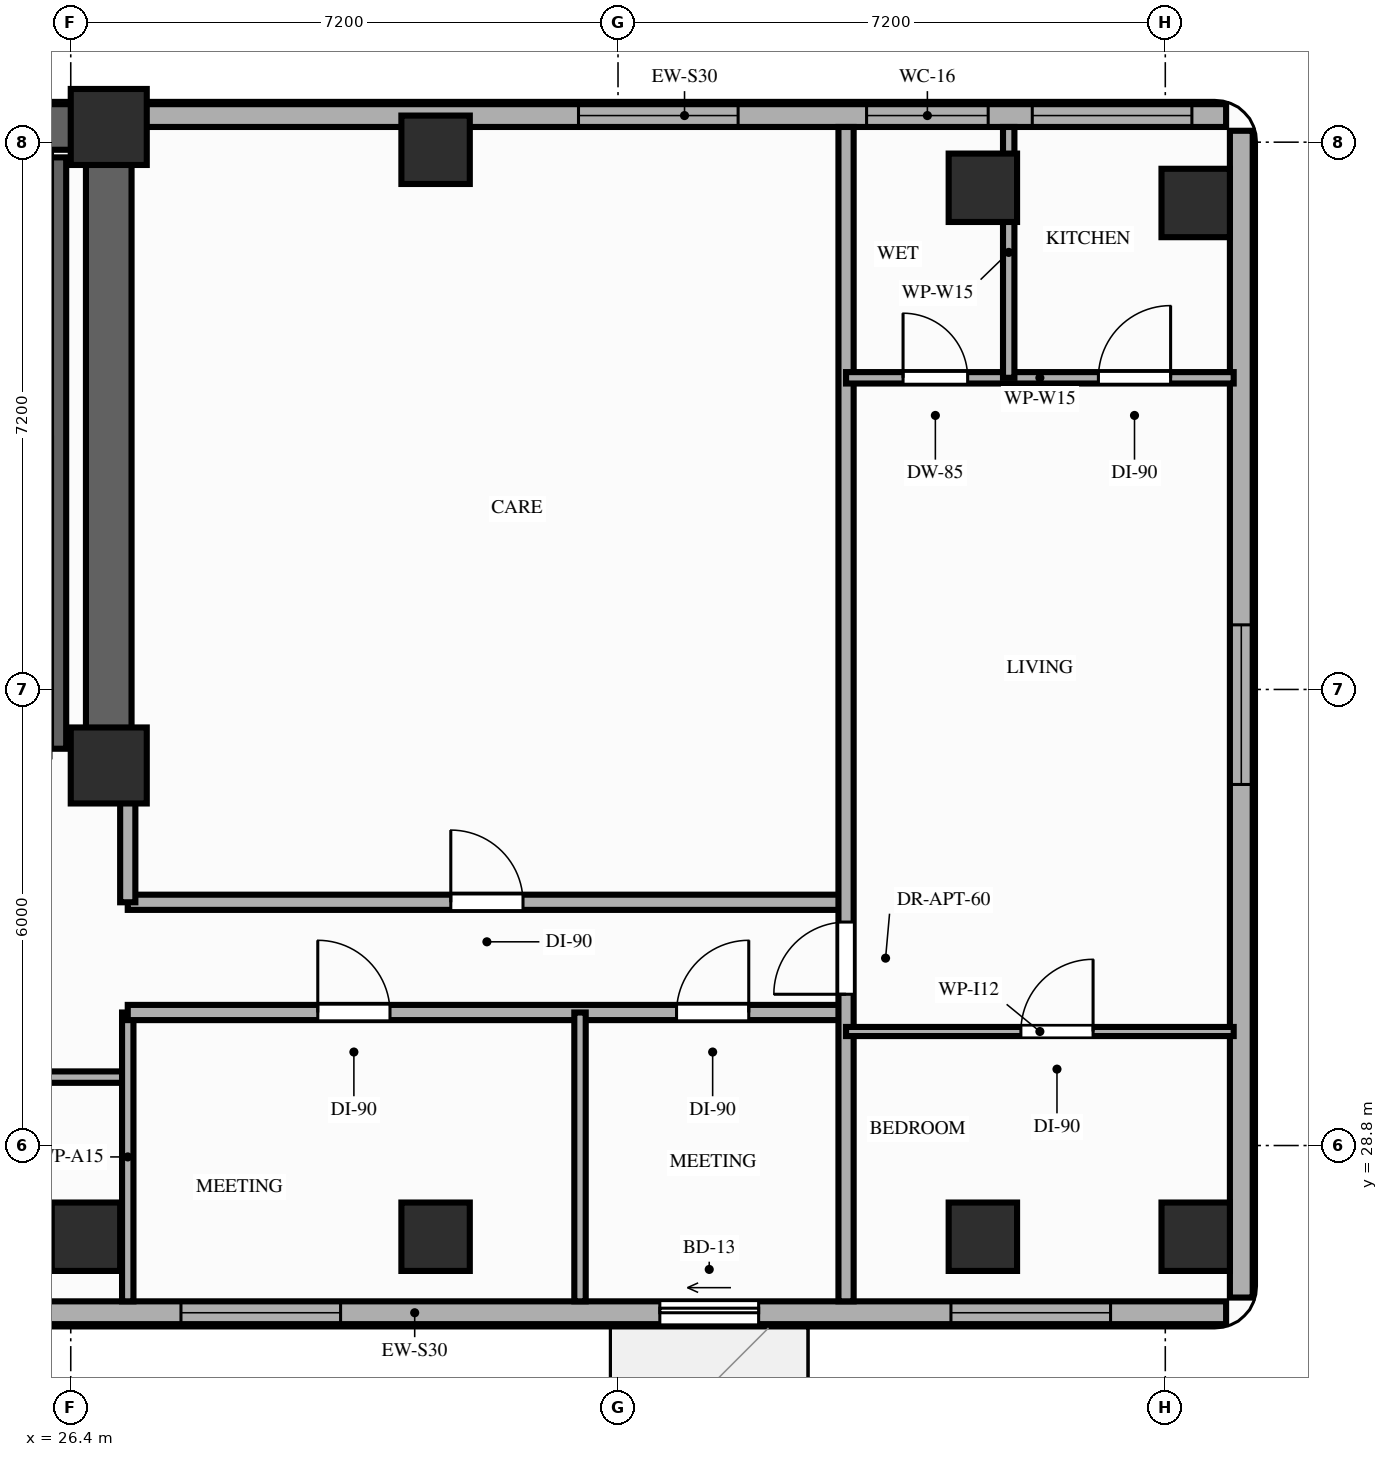
"""IFC4 building model, lengths in metres.
Left out: names, types, materials, properties, quantities, classifications, styles, units other than length and angle.
Written with IfcOpenShell. Run it as: python <this file> out.ifc"""

import sys

from ifc_helpers import new_model, si_unit, direction, frame, frame_2d, origin, origin_2d, place, context, subcontext, project, spatial, rectangle, extrude, element, fill, save


model = new_model("IFC4")
c1 = context("Model", 3, precision=1e-05, world=origin(), true_north=direction((0.0, 1.0)))
c2 = subcontext(c1, "Body", "Model", "MODEL_VIEW")
j1 = project(units=[si_unit("LENGTHUNIT", "METRE"), si_unit("PLANEANGLEUNIT", "RADIAN")], contexts=[c1])
p1 = place(None, origin())
s1 = spatial("IfcSite", under=j1, at=p1, CompositionType="ELEMENT")
p2 = place(p1, origin())
s2 = spatial("IfcBuilding", under=s1, at=p2, CompositionType="ELEMENT")
p3 = place(p2, frame((0.0, 0.0, 188.8)))
s3 = spatial("IfcBuildingStorey", under=s2, at=p3, CompositionType="ELEMENT", Elevation=188.8)
for number, where, z_axis, x_axis in (
    (1, (26.9, 33.8, 0.0), (0.0, 0.0, 1.0), (1.0, 0.0, 0.0)),
    (2, (26.9, 42.2, 0.0), (0.0, 0.0, 1.0), (1.0, 0.0, 0.0)),
):
    element("IfcColumn", number, at=place(p3, frame(where, z_axis=z_axis, x_axis=x_axis)), inside=s3, PredefinedType="COLUMN", context=c2, shape_type="SweptSolid", body=[
        extrude(rectangle(XDim=1.0, YDim=1.0, at=origin_2d()), origin(), (0.0, 0.0, 1.0), 3.2),
    ])
for number, where, z_axis, x_axis in (
    (3, (26.6, 27.6, 0.0), (0.0, 0.0, 1.0), (1.0, 0.0, 0.0)),
    (4, (31.2, 27.6, 0.0), (0.0, 0.0, 1.0), (1.0, 0.0, 0.0)),
    (5, (31.2, 41.9, 0.0), (0.0, 0.0, 1.0), (1.0, 0.0, 0.0)),
    (6, (38.4, 27.6, 0.0), (0.0, 0.0, 1.0), (1.0, 0.0, 0.0)),
    (7, (38.4, 41.4, 0.0), (0.0, 0.0, 1.0), (1.0, 0.0, 0.0)),
    (8, (41.2, 27.6, 0.0), (0.0, 0.0, 1.0), (1.0, 0.0, 0.0)),
    (9, (41.2, 41.2, 0.0), (0.0, 0.0, 1.0), (1.0, 0.0, 0.0)),
):
    element("IfcColumn", number, at=place(p3, frame(where, z_axis=z_axis, x_axis=x_axis)), inside=s3, PredefinedType="COLUMN", context=c2, shape_type="SweptSolid", body=[
        extrude(rectangle(XDim=0.9, YDim=0.9, at=origin_2d()), origin(), (0.0, 0.0, 1.0), 3.2),
    ])
p4 = place(p3, frame((41.6, 42.35, 0.0), z_axis=(0.0, 0.0, 1.0), x_axis=(-1.0, 0.0, 0.0)))
e10 = element("IfcWall", 10, at=p4, inside=s3, PredefinedType="STANDARD", context=c2, shape_type="SweptSolid", body=[
    extrude(rectangle(XDim=14.25, YDim=0.3, at=frame_2d((7.125, 0.0))), origin(), (0.0, 0.0, 1.0), 2.51),
])
p5 = place(p4, frame((3.13, 0.0, 0.85)))
e11 = element("IfcOpeningElement", 11, at=p5, cuts=e10, PredefinedType="OPENING", context=c2, shape_type="SweptSolid", body=[
    extrude(rectangle(XDim=1.6, YDim=1.41, at=frame_2d((0.8, 0.705))), frame((0.0, 0.16, 0.0), z_axis=(0.0, -1.0, 0.0), x_axis=(1.0, 0.0, 0.0)), (0.0, 0.0, 1.0), 0.32),
])
p6 = place(p4, frame((0.45, 0.0, 0.85)))
e12 = element("IfcOpeningElement", 12, at=p6, cuts=e10, PredefinedType="OPENING", context=c2, shape_type="SweptSolid", body=[
    extrude(rectangle(XDim=2.1, YDim=1.41, at=frame_2d((1.05, 0.705))), frame((0.0, 0.16, 0.0), z_axis=(0.0, -1.0, 0.0), x_axis=(1.0, 0.0, 0.0)), (0.0, 0.0, 1.0), 0.32),
])
p7 = place(p4, frame((6.42, 0.0, 0.85)))
e13 = element("IfcOpeningElement", 13, at=p7, cuts=e10, PredefinedType="OPENING", context=c2, shape_type="SweptSolid", body=[
    extrude(rectangle(XDim=2.1, YDim=1.41, at=frame_2d((1.05, 0.705))), frame((0.0, 0.16, 0.0), z_axis=(0.0, -1.0, 0.0), x_axis=(1.0, 0.0, 0.0)), (0.0, 0.0, 1.0), 0.32),
])
p8 = place(p3, frame((20.25, 26.6, 0.0), z_axis=(0.0, 0.0, 1.0), x_axis=(1.0, 0.0, 0.0)))
e14 = element("IfcWall", 14, at=p8, inside=s3, PredefinedType="STANDARD", context=c2, shape_type="SweptSolid", body=[
    extrude(rectangle(XDim=21.35, YDim=0.3, at=frame_2d((10.675, 0.0))), origin(), (0.0, 0.0, 1.0), 2.71),
])
p9 = place(p8, frame((13.9, 0.0, 0.0)))
e15 = element("IfcOpeningElement", 15, at=p9, cuts=e14, PredefinedType="OPENING", context=c2, shape_type="SweptSolid", body=[
    extrude(rectangle(XDim=1.3, YDim=2.08, at=frame_2d((0.65, 1.04))), frame((0.0, 0.16, 0.0), z_axis=(0.0, -1.0, 0.0), x_axis=(1.0, 0.0, 0.0)), (0.0, 0.0, 1.0), 0.32),
])
p10 = place(p8, frame((17.73, 0.0, 0.85)))
e16 = element("IfcOpeningElement", 16, at=p10, cuts=e14, PredefinedType="OPENING", context=c2, shape_type="SweptSolid", body=[
    extrude(rectangle(XDim=2.1, YDim=1.61, at=frame_2d((1.05, 0.805))), frame((0.0, 0.16, 0.0), z_axis=(0.0, -1.0, 0.0), x_axis=(1.0, 0.0, 0.0)), (0.0, 0.0, 1.0), 0.32),
])
p11 = place(p8, frame((2.1, 0.0, 0.85)))
e17 = element("IfcOpeningElement", 17, at=p11, cuts=e14, PredefinedType="OPENING", context=c2, shape_type="SweptSolid", body=[
    extrude(rectangle(XDim=2.1, YDim=1.61, at=frame_2d((1.05, 0.805))), frame((0.0, 0.16, 0.0), z_axis=(0.0, -1.0, 0.0), x_axis=(1.0, 0.0, 0.0)), (0.0, 0.0, 1.0), 0.32),
])
p12 = place(p8, frame((7.6, 0.0, 0.85)))
e18 = element("IfcOpeningElement", 18, at=p12, cuts=e14, PredefinedType="OPENING", context=c2, shape_type="SweptSolid", body=[
    extrude(rectangle(XDim=2.1, YDim=1.61, at=frame_2d((1.05, 0.805))), frame((0.0, 0.16, 0.0), z_axis=(0.0, -1.0, 0.0), x_axis=(1.0, 0.0, 0.0)), (0.0, 0.0, 1.0), 0.32),
])
p13 = place(p3, frame((41.8, 26.8, 0.0), z_axis=(0.0, 0.0, 1.0), x_axis=(0.0, 1.0, 0.0)))
e19 = element("IfcWall", 19, at=p13, inside=s3, PredefinedType="STANDARD", context=c2, shape_type="SweptSolid", body=[
    extrude(rectangle(XDim=15.35, YDim=0.3, at=frame_2d((7.675, 0.0))), origin(), (0.0, 0.0, 1.0), 3.02),
])
p14 = place(p13, frame((6.75, 0.0, 0.85)))
e20 = element("IfcOpeningElement", 20, at=p14, cuts=e19, PredefinedType="OPENING", context=c2, shape_type="SweptSolid", body=[
    extrude(rectangle(XDim=2.1, YDim=1.8, at=frame_2d((1.05, 0.9))), frame((0.0, 0.16, 0.0), z_axis=(0.0, -1.0, 0.0), x_axis=(1.0, 0.0, 0.0)), (0.0, 0.0, 1.0), 0.32),
])
p15 = place(p3, frame((6.45, 42.2, 0.0), z_axis=(0.0, 0.0, 1.0), x_axis=(1.0, 0.0, 0.0)))
e21 = element("IfcWall", 21, at=p15, inside=s3, PredefinedType="SHEAR", context=c2, shape_type="SweptSolid", body=[
    extrude(rectangle(XDim=20.45, YDim=0.6, at=frame_2d((10.225, 0.0))), origin(), (0.0, 0.0, 1.0), 3.02),
])
p16 = place(p3, frame((26.9, 33.8, 0.0), z_axis=(0.0, 0.0, 1.0), x_axis=(0.0, 1.0, 0.0)))
e22 = element("IfcWall", 22, at=p16, inside=s3, PredefinedType="SHEAR", context=c2, shape_type="SweptSolid", body=[
    extrude(rectangle(XDim=7.95, YDim=0.6, at=frame_2d((3.975, 0.0))), origin(), (0.0, 0.0, 1.0), 3.02),
])
p17 = place(p3, frame((26.24, 34.02, 0.0), z_axis=(0.0, 0.0, 1.0), x_axis=(0.0, 1.0, 0.0)))
e23 = element("IfcWall", 23, at=p17, inside=s3, PredefinedType="SHEAR", context=c2, shape_type="SweptSolid", body=[
    extrude(rectangle(XDim=7.78, YDim=0.2, at=frame_2d((3.89, 0.0))), origin(), (0.0, 0.0, 1.0), 3.02),
])
p18 = place(p3, frame((20.45, 29.7, 0.0), z_axis=(0.0, 0.0, 1.0), x_axis=(1.0, 0.0, 0.0)))
e24 = element("IfcWall", 24, at=p18, inside=s3, PredefinedType="PARTITIONING", context=c2, shape_type="SweptSolid", body=[
    extrude(rectangle(XDim=6.7, YDim=0.15, at=frame_2d((3.35, 0.0))), origin(), (0.0, 0.0, 1.0), 3.02),
])
p19 = place(p18, frame((2.8, 0.0, 0.0)))
e25 = element("IfcOpeningElement", 25, at=p19, cuts=e24, PredefinedType="OPENING", context=c2, shape_type="SweptSolid", body=[
    extrude(rectangle(XDim=0.95, YDim=2.15, at=frame_2d((0.475, 1.075))), frame((0.0, 0.085, 0.0), z_axis=(0.0, -1.0, 0.0), x_axis=(1.0, 0.0, 0.0)), (0.0, 0.0, 1.0), 0.17),
])
p20 = place(p3, frame((27.15, 26.75, 0.0), z_axis=(0.0, 0.0, 1.0), x_axis=(0.0, 1.0, 0.0)))
e26 = element("IfcWall", 26, at=p20, inside=s3, PredefinedType="PARTITIONING", context=c2, shape_type="SweptSolid", body=[
    extrude(rectangle(XDim=3.8, YDim=0.15, at=frame_2d((1.9, 0.0))), origin(), (0.0, 0.0, 1.0), 2.51),
])
p21 = place(p3, frame((27.15, 30.55, 0.0), z_axis=(0.0, 0.0, 1.0), x_axis=(1.0, 0.0, 0.0)))
e27 = element("IfcWall", 27, at=p21, inside=s3, PredefinedType="PARTITIONING", context=c2, shape_type="SweptSolid", body=[
    extrude(rectangle(XDim=9.45, YDim=0.2, at=frame_2d((4.725, 0.0))), origin(), (0.0, 0.0, 1.0), 2.51),
])
p22 = place(p21, frame((2.5, 0.0, 0.0)))
e28 = element("IfcOpeningElement", 28, at=p22, cuts=e27, PredefinedType="OPENING", context=c2, shape_type="SweptSolid", body=[
    extrude(rectangle(XDim=0.95, YDim=2.15, at=frame_2d((0.475, 1.075))), frame((0.0, 0.11, 0.0), z_axis=(0.0, -1.0, 0.0), x_axis=(1.0, 0.0, 0.0)), (0.0, 0.0, 1.0), 0.22),
])
p23 = place(p21, frame((7.22, 0.0, 0.0)))
e29 = element("IfcOpeningElement", 29, at=p23, cuts=e27, PredefinedType="OPENING", context=c2, shape_type="SweptSolid", body=[
    extrude(rectangle(XDim=0.95, YDim=2.15, at=frame_2d((0.475, 1.075))), frame((0.0, 0.11, 0.0), z_axis=(0.0, -1.0, 0.0), x_axis=(1.0, 0.0, 0.0)), (0.0, 0.0, 1.0), 0.22),
])
p24 = place(p3, frame((27.15, 32.0, 0.0), z_axis=(0.0, 0.0, 1.0), x_axis=(1.0, 0.0, 0.0)))
e30 = element("IfcWall", 30, at=p24, inside=s3, PredefinedType="PARTITIONING", context=c2, shape_type="SweptSolid", body=[
    extrude(rectangle(XDim=9.45, YDim=0.2, at=frame_2d((4.725, 0.0))), origin(), (0.0, 0.0, 1.0), 2.51),
])
p25 = place(p24, frame((4.25, 0.0, 0.0)))
e31 = element("IfcOpeningElement", 31, at=p25, cuts=e30, PredefinedType="OPENING", context=c2, shape_type="SweptSolid", body=[
    extrude(rectangle(XDim=0.95, YDim=2.15, at=frame_2d((0.475, 1.075))), frame((0.0, 0.11, 0.0), z_axis=(0.0, -1.0, 0.0), x_axis=(1.0, 0.0, 0.0)), (0.0, 0.0, 1.0), 0.22),
])
p26 = place(p3, frame((27.15, 32.0, 0.0), z_axis=(0.0, 0.0, 1.0), x_axis=(0.0, 1.0, 0.0)))
e32 = element("IfcWall", 32, at=p26, inside=s3, PredefinedType="PARTITIONING", context=c2, shape_type="SweptSolid", body=[
    extrude(rectangle(XDim=1.68, YDim=0.2, at=frame_2d((0.84, 0.0))), origin(), (0.0, 0.0, 1.0), 2.51),
])
p27 = place(p3, frame((36.6, 26.75, 0.0), z_axis=(0.0, 0.0, 1.0), x_axis=(0.0, 1.0, 0.0)))
e33 = element("IfcWall", 33, at=p27, inside=s3, PredefinedType="PARTITIONING", context=c2, shape_type="SweptSolid", body=[
    extrude(rectangle(XDim=15.45, YDim=0.2, at=frame_2d((7.725, 0.0))), origin(), (0.0, 0.0, 1.0), 2.51),
])
p28 = place(p27, frame((4.04, 0.0, 0.0)))
e34 = element("IfcOpeningElement", 34, at=p28, cuts=e33, PredefinedType="OPENING", context=c2, shape_type="SweptSolid", body=[
    extrude(rectangle(XDim=0.95, YDim=2.15, at=frame_2d((0.475, 1.075))), frame((0.0, 0.11, 0.0), z_axis=(0.0, -1.0, 0.0), x_axis=(1.0, 0.0, 0.0)), (0.0, 0.0, 1.0), 0.22),
])
p29 = place(p3, frame((36.6, 30.3, 0.0), z_axis=(0.0, 0.0, 1.0), x_axis=(1.0, 0.0, 0.0)))
e35 = element("IfcWall", 35, at=p29, inside=s3, PredefinedType="PARTITIONING", context=c2, shape_type="SweptSolid", body=[
    extrude(rectangle(XDim=5.1, YDim=0.12, at=frame_2d((2.55, 0.0))), origin(), (0.0, 0.0, 1.0), 2.51),
])
p30 = place(p29, frame((2.3, 0.0, 0.0)))
e36 = element("IfcOpeningElement", 36, at=p30, cuts=e35, PredefinedType="OPENING", context=c2, shape_type="SweptSolid", body=[
    extrude(rectangle(XDim=0.95, YDim=2.15, at=frame_2d((0.475, 1.075))), frame((0.0, 0.07, 0.0), z_axis=(0.0, -1.0, 0.0), x_axis=(1.0, 0.0, 0.0)), (0.0, 0.0, 1.0), 0.14),
])
p31 = place(p3, frame((36.6, 38.9, 0.0), z_axis=(0.0, 0.0, 1.0), x_axis=(1.0, 0.0, 0.0)))
e37 = element("IfcWall", 37, at=p31, inside=s3, PredefinedType="PARTITIONING", context=c2, shape_type="SweptSolid", body=[
    extrude(rectangle(XDim=5.1, YDim=0.15, at=frame_2d((2.55, 0.0))), origin(), (0.0, 0.0, 1.0), 2.51),
])
p32 = place(p31, frame((0.75, 0.0, 0.0)))
e38 = element("IfcOpeningElement", 38, at=p32, cuts=e37, PredefinedType="OPENING", context=c2, shape_type="SweptSolid", body=[
    extrude(rectangle(XDim=0.85, YDim=2.1, at=frame_2d((0.425, 1.05))), frame((0.0, 0.085, 0.0), z_axis=(0.0, -1.0, 0.0), x_axis=(1.0, 0.0, 0.0)), (0.0, 0.0, 1.0), 0.17),
])
p33 = place(p31, frame((3.32, 0.0, 0.0)))
e39 = element("IfcOpeningElement", 39, at=p33, cuts=e37, PredefinedType="OPENING", context=c2, shape_type="SweptSolid", body=[
    extrude(rectangle(XDim=0.95, YDim=2.15, at=frame_2d((0.475, 1.075))), frame((0.0, 0.085, 0.0), z_axis=(0.0, -1.0, 0.0), x_axis=(1.0, 0.0, 0.0)), (0.0, 0.0, 1.0), 0.17),
])
p34 = place(p3, frame((38.74, 38.9, 0.0), z_axis=(0.0, 0.0, 1.0), x_axis=(0.0, 1.0, 0.0)))
e40 = element("IfcWall", 40, at=p34, inside=s3, PredefinedType="PARTITIONING", context=c2, shape_type="SweptSolid", body=[
    extrude(rectangle(XDim=3.3, YDim=0.15, at=frame_2d((1.65, 0.0))), origin(), (0.0, 0.0, 1.0), 2.51),
])
p35 = place(p3, frame((33.1, 26.75, 0.0), z_axis=(0.0, 0.0, 1.0), x_axis=(0.0, 1.0, 0.0)))
e41 = element("IfcWall", 41, at=p35, inside=s3, PredefinedType="PARTITIONING", context=c2, shape_type="SweptSolid", body=[
    extrude(rectangle(XDim=3.8, YDim=0.15, at=frame_2d((1.9, 0.0))), origin(), (0.0, 0.0, 1.0), 2.51),
])
p36 = place(p9, origin())
e42 = element("IfcDoor", 42, at=p36, inside=s3, OperationType="SLIDING_TO_LEFT", PredefinedType="DOOR", context=c2, shape_type="SweptSolid", body=[
    extrude(rectangle(XDim=1.3, YDim=2.08, at=frame_2d((0.65, 1.04))), frame((0.0, 0.025, 0.0), z_axis=(0.0, -1.0, 0.0), x_axis=(1.0, 0.0, 0.0)), (0.0, 0.0, 1.0), 0.05),
])
fill(e15, e42)
p37 = place(p14, origin())
e43 = element("IfcWindow", 43, at=p37, inside=s3, PartitioningType="SINGLE_PANEL", PredefinedType="WINDOW", context=c2, shape_type="SweptSolid", body=[
    extrude(rectangle(XDim=2.1, YDim=1.8, at=frame_2d((1.05, 0.9))), frame((0.0, 0.03, 0.0), z_axis=(0.0, -1.0, 0.0), x_axis=(1.0, 0.0, 0.0)), (0.0, 0.0, 1.0), 0.06),
])
fill(e20, e43)
p38 = place(p10, origin())
e44 = element("IfcWindow", 44, at=p38, inside=s3, PartitioningType="SINGLE_PANEL", PredefinedType="WINDOW", context=c2, shape_type="SweptSolid", body=[
    extrude(rectangle(XDim=2.1, YDim=1.61, at=frame_2d((1.05, 0.805))), frame((0.0, 0.03, 0.0), z_axis=(0.0, -1.0, 0.0), x_axis=(1.0, 0.0, 0.0)), (0.0, 0.0, 1.0), 0.06),
])
fill(e16, e44)
p39 = place(p5, origin())
e45 = element("IfcWindow", 45, at=p39, inside=s3, PartitioningType="SINGLE_PANEL", PredefinedType="WINDOW", context=c2, shape_type="SweptSolid", body=[
    extrude(rectangle(XDim=1.6, YDim=1.41, at=frame_2d((0.8, 0.705))), frame((0.0, 0.03, 0.0), z_axis=(0.0, -1.0, 0.0), x_axis=(1.0, 0.0, 0.0)), (0.0, 0.0, 1.0), 0.06),
])
fill(e11, e45)
p40 = place(p6, origin())
e46 = element("IfcWindow", 46, at=p40, inside=s3, PartitioningType="SINGLE_PANEL", PredefinedType="WINDOW", context=c2, shape_type="SweptSolid", body=[
    extrude(rectangle(XDim=2.1, YDim=1.41, at=frame_2d((1.05, 0.705))), frame((0.0, 0.03, 0.0), z_axis=(0.0, -1.0, 0.0), x_axis=(1.0, 0.0, 0.0)), (0.0, 0.0, 1.0), 0.06),
])
fill(e12, e46)
p41 = place(p7, origin())
e47 = element("IfcWindow", 47, at=p41, inside=s3, PartitioningType="SINGLE_PANEL", PredefinedType="WINDOW", context=c2, shape_type="SweptSolid", body=[
    extrude(rectangle(XDim=2.1, YDim=1.41, at=frame_2d((1.05, 0.705))), frame((0.0, 0.03, 0.0), z_axis=(0.0, -1.0, 0.0), x_axis=(1.0, 0.0, 0.0)), (0.0, 0.0, 1.0), 0.06),
])
fill(e13, e47)
p42 = place(p12, origin())
e48 = element("IfcWindow", 48, at=p42, inside=s3, PartitioningType="SINGLE_PANEL", PredefinedType="WINDOW", context=c2, shape_type="SweptSolid", body=[
    extrude(rectangle(XDim=2.1, YDim=1.61, at=frame_2d((1.05, 0.805))), frame((0.0, 0.03, 0.0), z_axis=(0.0, -1.0, 0.0), x_axis=(1.0, 0.0, 0.0)), (0.0, 0.0, 1.0), 0.06),
])
fill(e18, e48)
p43 = place(p28, origin())
e49 = element("IfcDoor", 49, at=p43, inside=s3, OperationType="SINGLE_SWING_LEFT", PredefinedType="DOOR", context=c2, shape_type="SweptSolid", body=[
    extrude(rectangle(XDim=0.95, YDim=2.15, at=frame_2d((0.475, 1.075))), frame((0.0, 0.025, 0.0), z_axis=(0.0, -1.0, 0.0), x_axis=(1.0, 0.0, 0.0)), (0.0, 0.0, 1.0), 0.05),
])
fill(e34, e49)
p44 = place(p30, origin())
e50 = element("IfcDoor", 50, at=p44, inside=s3, OperationType="SINGLE_SWING_RIGHT", PredefinedType="DOOR", context=c2, shape_type="SweptSolid", body=[
    extrude(rectangle(XDim=0.95, YDim=2.15, at=frame_2d((0.475, 1.075))), frame((0.0, 0.025, 0.0), z_axis=(0.0, -1.0, 0.0), x_axis=(1.0, 0.0, 0.0)), (0.0, 0.0, 1.0), 0.05),
])
fill(e36, e50)
p45 = place(p32, origin())
e51 = element("IfcDoor", 51, at=p45, inside=s3, OperationType="SINGLE_SWING_LEFT", PredefinedType="DOOR", context=c2, shape_type="SweptSolid", body=[
    extrude(rectangle(XDim=0.85, YDim=2.1, at=frame_2d((0.425, 1.05))), frame((0.0, 0.025, 0.0), z_axis=(0.0, -1.0, 0.0), x_axis=(1.0, 0.0, 0.0)), (0.0, 0.0, 1.0), 0.05),
])
fill(e38, e51)
p46 = place(p33, origin())
e52 = element("IfcDoor", 52, at=p46, inside=s3, OperationType="SINGLE_SWING_RIGHT", PredefinedType="DOOR", context=c2, shape_type="SweptSolid", body=[
    extrude(rectangle(XDim=0.95, YDim=2.15, at=frame_2d((0.475, 1.075))), frame((0.0, 0.025, 0.0), z_axis=(0.0, -1.0, 0.0), x_axis=(1.0, 0.0, 0.0)), (0.0, 0.0, 1.0), 0.05),
])
fill(e39, e52)
p47 = place(p22, origin())
e53 = element("IfcDoor", 53, at=p47, inside=s3, OperationType="SINGLE_SWING_LEFT", PredefinedType="DOOR", context=c2, shape_type="SweptSolid", body=[
    extrude(rectangle(XDim=0.95, YDim=2.15, at=frame_2d((0.475, 1.075))), frame((0.0, 0.025, 0.0), z_axis=(0.0, -1.0, 0.0), x_axis=(1.0, 0.0, 0.0)), (0.0, 0.0, 1.0), 0.05),
])
fill(e28, e53)
p48 = place(p23, origin())
e54 = element("IfcDoor", 54, at=p48, inside=s3, OperationType="SINGLE_SWING_RIGHT", PredefinedType="DOOR", context=c2, shape_type="SweptSolid", body=[
    extrude(rectangle(XDim=0.95, YDim=2.15, at=frame_2d((0.475, 1.075))), frame((0.0, 0.025, 0.0), z_axis=(0.0, -1.0, 0.0), x_axis=(1.0, 0.0, 0.0)), (0.0, 0.0, 1.0), 0.05),
])
fill(e29, e54)
p49 = place(p25, origin())
e55 = element("IfcDoor", 55, at=p49, inside=s3, OperationType="SINGLE_SWING_LEFT", PredefinedType="DOOR", context=c2, shape_type="SweptSolid", body=[
    extrude(rectangle(XDim=0.95, YDim=2.15, at=frame_2d((0.475, 1.075))), frame((0.0, 0.025, 0.0), z_axis=(0.0, -1.0, 0.0), x_axis=(1.0, 0.0, 0.0)), (0.0, 0.0, 1.0), 0.05),
])
fill(e31, e55)
save(model, sys.argv[1])
